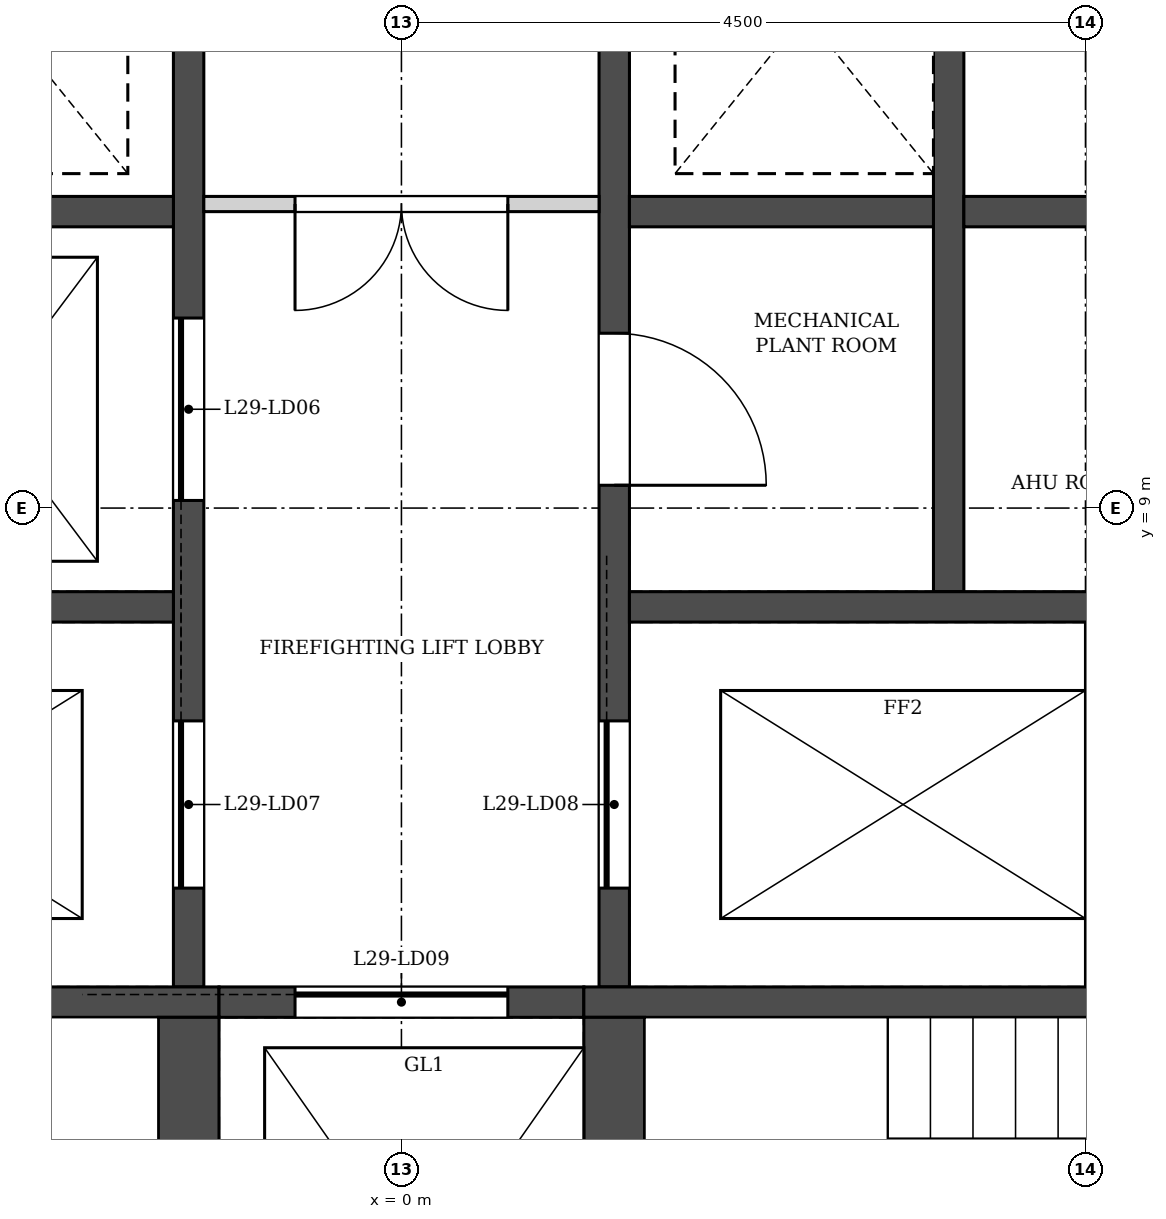
"""IFC4 building model, lengths in metres.
Left out: names, types, materials, properties, quantities, classifications, styles, units other than length and angle.
Written with IfcOpenShell. Run it as: python <this file> out.ifc"""

import sys

from ifc_helpers import new_model, si_unit, direction, frame, frame_2d, origin, place, context, subcontext, project, spatial, rectangle, extrude, element, fill, save


model = new_model("IFC4")
c1 = context("Model", 3, precision=1e-05, world=origin(), true_north=direction((0.0, 1.0)))
c2 = subcontext(c1, "Body", "Model", "MODEL_VIEW")
j1 = project(units=[si_unit("LENGTHUNIT", "METRE"), si_unit("PLANEANGLEUNIT", "RADIAN")], contexts=[c1])
p1 = place(None, origin())
s1 = spatial("IfcSite", under=j1, at=p1, CompositionType="ELEMENT")
p2 = place(p1, origin())
s2 = spatial("IfcBuilding", under=s1, at=p2, CompositionType="ELEMENT")
p3 = place(p2, frame((0.0, 0.0, 132.1)))
s3 = spatial("IfcBuildingStorey", under=s2, at=p3, CompositionType="ELEMENT", Elevation=132.1)
p4 = place(p3, frame((29.746, 7.709, 0.0), z_axis=(0.0, 0.0, 1.0), x_axis=(-0.500000700546, 0.866024999324, 0.0)))
e1 = element("IfcWall", 1, at=p4, inside=s3, PredefinedType="SOLIDWALL", context=c2, shape_type="SweptSolid", body=[
    extrude(rectangle(XDim=50.787, YDim=0.34, at=frame_2d((25.393, 0.0))), origin(), (0.0, 0.0, 1.0), 5.0),
])
p5 = place(p4, frame((3.197, 0.0, 0.9)))
e2 = element("IfcOpeningElement", 2, at=p5, cuts=e1, PredefinedType="OPENING", context=c2, shape_type="SweptSolid", body=[
    extrude(rectangle(XDim=1.885, YDim=3.0, at=frame_2d((0.942, 1.5))), frame((0.0, 0.18, 0.0), z_axis=(0.0, -1.0, 0.0), x_axis=(1.0, 0.0, 0.0)), (0.0, 0.0, 1.0), 0.36),
])
p6 = place(p4, frame((6.197, 0.0, 0.9)))
e3 = element("IfcOpeningElement", 3, at=p6, cuts=e1, PredefinedType="OPENING", context=c2, shape_type="SweptSolid", body=[
    extrude(rectangle(XDim=1.885, YDim=3.0, at=frame_2d((0.942, 1.5))), frame((0.0, 0.18, 0.0), z_axis=(0.0, -1.0, 0.0), x_axis=(1.0, 0.0, 0.0)), (0.0, 0.0, 1.0), 0.36),
])
p7 = place(p4, frame((9.197, 0.0, 0.9)))
e4 = element("IfcOpeningElement", 4, at=p7, cuts=e1, PredefinedType="OPENING", context=c2, shape_type="SweptSolid", body=[
    extrude(rectangle(XDim=1.885, YDim=3.0, at=frame_2d((0.942, 1.5))), frame((0.0, 0.18, 0.0), z_axis=(0.0, -1.0, 0.0), x_axis=(1.0, 0.0, 0.0)), (0.0, 0.0, 1.0), 0.36),
])
p8 = place(p4, frame((12.197, 0.0, 0.9)))
e5 = element("IfcOpeningElement", 5, at=p8, cuts=e1, PredefinedType="OPENING", context=c2, shape_type="SweptSolid", body=[
    extrude(rectangle(XDim=1.885, YDim=3.0, at=frame_2d((0.942, 1.5))), frame((0.0, 0.18, 0.0), z_axis=(0.0, -1.0, 0.0), x_axis=(1.0, 0.0, 0.0)), (0.0, 0.0, 1.0), 0.36),
])
p9 = place(p4, frame((15.197, 0.0, 0.9)))
e6 = element("IfcOpeningElement", 6, at=p9, cuts=e1, PredefinedType="OPENING", context=c2, shape_type="SweptSolid", body=[
    extrude(rectangle(XDim=1.885, YDim=3.0, at=frame_2d((0.942, 1.5))), frame((0.0, 0.18, 0.0), z_axis=(0.0, -1.0, 0.0), x_axis=(1.0, 0.0, 0.0)), (0.0, 0.0, 1.0), 0.36),
])
p10 = place(p4, frame((18.197, 0.0, 0.9)))
e7 = element("IfcOpeningElement", 7, at=p10, cuts=e1, PredefinedType="OPENING", context=c2, shape_type="SweptSolid", body=[
    extrude(rectangle(XDim=1.885, YDim=3.0, at=frame_2d((0.942, 1.5))), frame((0.0, 0.18, 0.0), z_axis=(0.0, -1.0, 0.0), x_axis=(1.0, 0.0, 0.0)), (0.0, 0.0, 1.0), 0.36),
])
p11 = place(p4, frame((21.197, 0.0, 0.9)))
e8 = element("IfcOpeningElement", 8, at=p11, cuts=e1, PredefinedType="OPENING", context=c2, shape_type="SweptSolid", body=[
    extrude(rectangle(XDim=1.885, YDim=3.0, at=frame_2d((0.942, 1.5))), frame((0.0, 0.18, 0.0), z_axis=(0.0, -1.0, 0.0), x_axis=(1.0, 0.0, 0.0)), (0.0, 0.0, 1.0), 0.36),
])
p12 = place(p4, frame((24.197, 0.0, 0.9)))
e9 = element("IfcOpeningElement", 9, at=p12, cuts=e1, PredefinedType="OPENING", context=c2, shape_type="SweptSolid", body=[
    extrude(rectangle(XDim=1.885, YDim=3.0, at=frame_2d((0.942, 1.5))), frame((0.0, 0.18, 0.0), z_axis=(0.0, -1.0, 0.0), x_axis=(1.0, 0.0, 0.0)), (0.0, 0.0, 1.0), 0.36),
])
p13 = place(p4, frame((27.197, 0.0, 0.9)))
e10 = element("IfcOpeningElement", 10, at=p13, cuts=e1, PredefinedType="OPENING", context=c2, shape_type="SweptSolid", body=[
    extrude(rectangle(XDim=1.885, YDim=3.0, at=frame_2d((0.942, 1.5))), frame((0.0, 0.18, 0.0), z_axis=(0.0, -1.0, 0.0), x_axis=(1.0, 0.0, 0.0)), (0.0, 0.0, 1.0), 0.36),
])
p14 = place(p4, frame((30.197, 0.0, 0.9)))
e11 = element("IfcOpeningElement", 11, at=p14, cuts=e1, PredefinedType="OPENING", context=c2, shape_type="SweptSolid", body=[
    extrude(rectangle(XDim=1.885, YDim=3.0, at=frame_2d((0.942, 1.5))), frame((0.0, 0.18, 0.0), z_axis=(0.0, -1.0, 0.0), x_axis=(1.0, 0.0, 0.0)), (0.0, 0.0, 1.0), 0.36),
])
p15 = place(p4, frame((33.197, 0.0, 0.9)))
e12 = element("IfcOpeningElement", 12, at=p15, cuts=e1, PredefinedType="OPENING", context=c2, shape_type="SweptSolid", body=[
    extrude(rectangle(XDim=1.885, YDim=3.0, at=frame_2d((0.942, 1.5))), frame((0.0, 0.18, 0.0), z_axis=(0.0, -1.0, 0.0), x_axis=(1.0, 0.0, 0.0)), (0.0, 0.0, 1.0), 0.36),
])
p16 = place(p4, frame((36.197, 0.0, 0.9)))
e13 = element("IfcOpeningElement", 13, at=p16, cuts=e1, PredefinedType="OPENING", context=c2, shape_type="SweptSolid", body=[
    extrude(rectangle(XDim=1.885, YDim=3.0, at=frame_2d((0.942, 1.5))), frame((0.0, 0.18, 0.0), z_axis=(0.0, -1.0, 0.0), x_axis=(1.0, 0.0, 0.0)), (0.0, 0.0, 1.0), 0.36),
])
p17 = place(p4, frame((39.197, 0.0, 0.9)))
e14 = element("IfcOpeningElement", 14, at=p17, cuts=e1, PredefinedType="OPENING", context=c2, shape_type="SweptSolid", body=[
    extrude(rectangle(XDim=1.885, YDim=3.0, at=frame_2d((0.942, 1.5))), frame((0.0, 0.18, 0.0), z_axis=(0.0, -1.0, 0.0), x_axis=(1.0, 0.0, 0.0)), (0.0, 0.0, 1.0), 0.36),
])
p18 = place(p4, frame((42.197, 0.0, 0.9)))
e15 = element("IfcOpeningElement", 15, at=p18, cuts=e1, PredefinedType="OPENING", context=c2, shape_type="SweptSolid", body=[
    extrude(rectangle(XDim=1.885, YDim=3.0, at=frame_2d((0.942, 1.5))), frame((0.0, 0.18, 0.0), z_axis=(0.0, -1.0, 0.0), x_axis=(1.0, 0.0, 0.0)), (0.0, 0.0, 1.0), 0.36),
])
p19 = place(p4, frame((45.197, 0.0, 0.9)))
e16 = element("IfcOpeningElement", 16, at=p19, cuts=e1, PredefinedType="OPENING", context=c2, shape_type="SweptSolid", body=[
    extrude(rectangle(XDim=1.885, YDim=3.0, at=frame_2d((0.942, 1.5))), frame((0.0, 0.18, 0.0), z_axis=(0.0, -1.0, 0.0), x_axis=(1.0, 0.0, 0.0)), (0.0, 0.0, 1.0), 0.36),
])
p20 = place(p3, frame((3.6, 8.45, -0.4), z_axis=(0.0, 0.0, 1.0), x_axis=(0.0, 1.0, 0.0)))
e17 = element("IfcWall", 17, at=p20, inside=s3, PredefinedType="SOLIDWALL", context=c2, shape_type="SweptSolid", body=[
    extrude(rectangle(XDim=7.8, YDim=0.2, at=frame_2d((3.9, 0.0))), origin(), (0.0, 0.0, 1.0), 5.4),
])
p21 = place(p3, frame((-1.4, 5.85, -0.4), z_axis=(0.0, 0.0, 1.0), x_axis=(0.0, 1.0, 0.0)))
e18 = element("IfcWall", 18, at=p21, inside=s3, PredefinedType="SOLIDWALL", context=c2, shape_type="SweptSolid", body=[
    extrude(rectangle(XDim=11.75, YDim=0.2, at=frame_2d((5.875, 0.0))), origin(), (0.0, 0.0, 1.0), 5.4),
])
p22 = place(p21, frame((3.2, 0.0, 0.4)))
e19 = element("IfcOpeningElement", 19, at=p22, cuts=e18, PredefinedType="OPENING", context=c2, shape_type="SweptSolid", body=[
    extrude(rectangle(XDim=1.2, YDim=2.1, at=frame_2d((0.6, 1.05))), frame((0.0, 0.11, 0.0), z_axis=(0.0, -1.0, 0.0), x_axis=(1.0, 0.0, 0.0)), (0.0, 0.0, 1.0), 0.22),
])
p23 = place(p21, frame((0.65, 0.0, 0.4)))
e20 = element("IfcOpeningElement", 20, at=p23, cuts=e18, PredefinedType="OPENING", context=c2, shape_type="SweptSolid", body=[
    extrude(rectangle(XDim=1.1, YDim=2.1, at=frame_2d((0.55, 1.05))), frame((0.0, 0.11, 0.0), z_axis=(0.0, -1.0, 0.0), x_axis=(1.0, 0.0, 0.0)), (0.0, 0.0, 1.0), 0.22),
])
p24 = place(p3, frame((1.4, 5.85, -0.4), z_axis=(0.0, 0.0, 1.0), x_axis=(0.0, 1.0, 0.0)))
e21 = element("IfcWall", 21, at=p24, inside=s3, PredefinedType="SOLIDWALL", context=c2, shape_type="SweptSolid", body=[
    extrude(rectangle(XDim=11.75, YDim=0.2, at=frame_2d((5.875, 0.0))), origin(), (0.0, 0.0, 1.0), 5.4),
])
p25 = place(p24, frame((0.65, 0.0, 0.4)))
e22 = element("IfcOpeningElement", 22, at=p25, cuts=e21, PredefinedType="OPENING", context=c2, shape_type="SweptSolid", body=[
    extrude(rectangle(XDim=1.1, YDim=2.1, at=frame_2d((0.55, 1.05))), frame((0.0, 0.11, 0.0), z_axis=(0.0, -1.0, 0.0), x_axis=(1.0, 0.0, 0.0)), (0.0, 0.0, 1.0), 0.22),
])
p26 = place(p24, frame((3.3, 0.0, 0.4)))
e23 = element("IfcOpeningElement", 23, at=p26, cuts=e21, PredefinedType="OPENING", context=c2, shape_type="SweptSolid", body=[
    extrude(rectangle(XDim=1.0, YDim=2.1, at=frame_2d((0.5, 1.05))), frame((0.0, 0.11, 0.0), z_axis=(0.0, -1.0, 0.0), x_axis=(1.0, 0.0, 0.0)), (0.0, 0.0, 1.0), 0.22),
])
for number, where, z_axis, x_axis in (
    (24, (-5.7, 8.35, -0.4), (0.0, 0.0, 1.0), (1.0, 0.0, 0.0)),
    (25, (1.5, 8.35, -0.4), (0.0, 0.0, 1.0), (1.0, 0.0, 0.0)),
):
    element("IfcWall", number, at=place(p3, frame(where, z_axis=z_axis, x_axis=x_axis)), inside=s3, PredefinedType="SOLIDWALL", context=c2, shape_type="SweptSolid", body=[
        extrude(rectangle(XDim=4.2, YDim=0.2, at=frame_2d((2.1, 0.0))), origin(), (0.0, 0.0, 1.0), 5.4),
    ])
p27 = place(p3, frame((-12.6, 5.75, -0.4), z_axis=(0.0, 0.0, 1.0), x_axis=(1.0, 0.0, 0.0)))
e26 = element("IfcWall", 26, at=p27, inside=s3, PredefinedType="SOLIDWALL", context=c2, shape_type="SweptSolid", body=[
    extrude(rectangle(XDim=11.4, YDim=0.2, at=frame_2d((5.7, 0.0))), origin(), (0.0, 0.0, 1.0), 5.4),
])
p28 = place(p3, frame((-1.2, 5.75, -0.4), z_axis=(0.0, 0.0, 1.0), x_axis=(1.0, 0.0, 0.0)))
e27 = element("IfcWall", 27, at=p28, inside=s3, PredefinedType="SOLIDWALL", context=c2, shape_type="SweptSolid", body=[
    extrude(rectangle(XDim=2.4, YDim=0.2, at=frame_2d((1.2, 0.0))), origin(), (0.0, 0.0, 1.0), 5.4),
])
p29 = place(p28, frame((0.5, 0.0, 0.4)))
e28 = element("IfcOpeningElement", 28, at=p29, cuts=e27, PredefinedType="OPENING", context=c2, shape_type="SweptSolid", body=[
    extrude(rectangle(XDim=1.4, YDim=2.1, at=frame_2d((0.7, 1.05))), frame((0.0, 0.11, 0.0), z_axis=(0.0, -1.0, 0.0), x_axis=(1.0, 0.0, 0.0)), (0.0, 0.0, 1.0), 0.22),
])
p30 = place(p3, frame((1.2, 5.75, -0.4), z_axis=(0.0, 0.0, 1.0), x_axis=(1.0, 0.0, 0.0)))
e29 = element("IfcWall", 29, at=p30, inside=s3, PredefinedType="SOLIDWALL", context=c2, shape_type="SweptSolid", body=[
    extrude(rectangle(XDim=11.4, YDim=0.2, at=frame_2d((5.7, 0.0))), origin(), (0.0, 0.0, 1.0), 5.4),
])
for number, where, z_axis, x_axis in (
    (30, (-1.4, 2.25, -0.4), (0.0, 0.0, 1.0), (0.0, 1.0, 0.0)),
    (31, (1.4, 2.25, -0.4), (0.0, 0.0, 1.0), (0.0, 1.0, 0.0)),
):
    element("IfcWall", number, at=place(p3, frame(where, z_axis=z_axis, x_axis=x_axis)), inside=s3, PredefinedType="SOLIDWALL", context=c2, shape_type="SweptSolid", body=[
        extrude(rectangle(XDim=3.4, YDim=0.4, at=frame_2d((1.7, 0.0))), origin(), (0.0, 0.0, 1.0), 5.4),
    ])
for number, where, z_axis, x_axis in (
    (32, (-3.5, 10.95, -0.4), (0.0, 0.0, 1.0), (1.0, 0.0, 0.0)),
    (33, (3.7, 10.95, -0.4), (0.0, 0.0, 1.0), (1.0, 0.0, 0.0)),
    (34, (1.5, 10.95, -0.4), (0.0, 0.0, 1.0), (1.0, 0.0, 0.0)),
):
    element("IfcWall", number, at=place(p3, frame(where, z_axis=z_axis, x_axis=x_axis)), inside=s3, PredefinedType="SOLIDWALL", context=c2, shape_type="SweptSolid", body=[
        extrude(rectangle(XDim=2.0, YDim=0.2, at=frame_2d((1.0, 0.0))), origin(), (0.0, 0.0, 1.0), 5.4),
    ])
p31 = place(p3, frame((-1.3, 11.0, 0.0), z_axis=(0.0, 0.0, 1.0), x_axis=(1.0, 0.0, 0.0)))
e35 = element("IfcWall", 35, at=p31, inside=s3, PredefinedType="PARTITIONING", context=c2, shape_type="SweptSolid", body=[
    extrude(rectangle(XDim=2.6, YDim=0.1, at=frame_2d((1.3, 0.0))), origin(), (0.0, 0.0, 1.0), 5.0),
])
p32 = place(p31, frame((0.6, 0.0, 0.0)))
e36 = element("IfcOpeningElement", 36, at=p32, cuts=e35, PredefinedType="OPENING", context=c2, shape_type="SweptSolid", body=[
    extrude(rectangle(XDim=1.4, YDim=2.1, at=frame_2d((0.7, 1.05))), frame((0.0, 0.06, 0.0), z_axis=(0.0, -1.0, 0.0), x_axis=(1.0, 0.0, 0.0)), (0.0, 0.0, 1.0), 0.12),
])
p33 = place(p22, origin())
e37 = element("IfcDoor", 37, at=p33, inside=s3, OperationType="SLIDING_TO_LEFT", PredefinedType="DOOR", context=c2, shape_type="SweptSolid", body=[
    extrude(rectangle(XDim=1.2, YDim=2.1, at=frame_2d((0.6, 1.05))), frame((0.0, 0.025, 0.0), z_axis=(0.0, -1.0, 0.0), x_axis=(1.0, 0.0, 0.0)), (0.0, 0.0, 1.0), 0.05),
])
fill(e19, e37)
p34 = place(p23, origin())
e38 = element("IfcDoor", 38, at=p34, inside=s3, OperationType="SLIDING_TO_RIGHT", PredefinedType="DOOR", context=c2, shape_type="SweptSolid", body=[
    extrude(rectangle(XDim=1.1, YDim=2.1, at=frame_2d((0.55, 1.05))), frame((0.0, 0.025, 0.0), z_axis=(0.0, -1.0, 0.0), x_axis=(1.0, 0.0, 0.0)), (0.0, 0.0, 1.0), 0.05),
])
fill(e20, e38)
p35 = place(p25, origin())
e39 = element("IfcDoor", 39, at=p35, inside=s3, OperationType="SLIDING_TO_RIGHT", PredefinedType="DOOR", context=c2, shape_type="SweptSolid", body=[
    extrude(rectangle(XDim=1.1, YDim=2.1, at=frame_2d((0.55, 1.05))), frame((0.0, 0.025, 0.0), z_axis=(0.0, -1.0, 0.0), x_axis=(1.0, 0.0, 0.0)), (0.0, 0.0, 1.0), 0.05),
])
fill(e22, e39)
p36 = place(p29, origin())
e40 = element("IfcDoor", 40, at=p36, inside=s3, OperationType="SLIDING_TO_LEFT", PredefinedType="DOOR", context=c2, shape_type="SweptSolid", body=[
    extrude(rectangle(XDim=1.4, YDim=2.1, at=frame_2d((0.7, 1.05))), frame((0.0, 0.025, 0.0), z_axis=(0.0, -1.0, 0.0), x_axis=(1.0, 0.0, 0.0)), (0.0, 0.0, 1.0), 0.05),
])
fill(e28, e40)
p37 = place(p26, frame((1.0, 0.0, 0.0), z_axis=(0.0, 0.0, 1.0), x_axis=(-1.0, 0.0, 0.0)))
e41 = element("IfcDoor", 41, at=p37, inside=s3, OperationType="SINGLE_SWING_RIGHT", PredefinedType="DOOR", context=c2, shape_type="SweptSolid", body=[
    extrude(rectangle(XDim=1.0, YDim=2.1, at=frame_2d((0.5, 1.05))), frame((0.0, 0.025, 0.0), z_axis=(0.0, -1.0, 0.0), x_axis=(1.0, 0.0, 0.0)), (0.0, 0.0, 1.0), 0.05),
])
fill(e23, e41)
p38 = place(p32, frame((1.4, 0.0, 0.0), z_axis=(0.0, 0.0, 1.0), x_axis=(-1.0, 0.0, 0.0)))
e42 = element("IfcDoor", 42, at=p38, inside=s3, OperationType="DOUBLE_DOOR_SINGLE_SWING", PredefinedType="DOOR", context=c2, shape_type="SweptSolid", body=[
    extrude(rectangle(XDim=1.4, YDim=2.1, at=frame_2d((0.7, 1.05))), frame((0.0, 0.025, 0.0), z_axis=(0.0, -1.0, 0.0), x_axis=(1.0, 0.0, 0.0)), (0.0, 0.0, 1.0), 0.05),
])
fill(e36, e42)
save(model, sys.argv[1])
